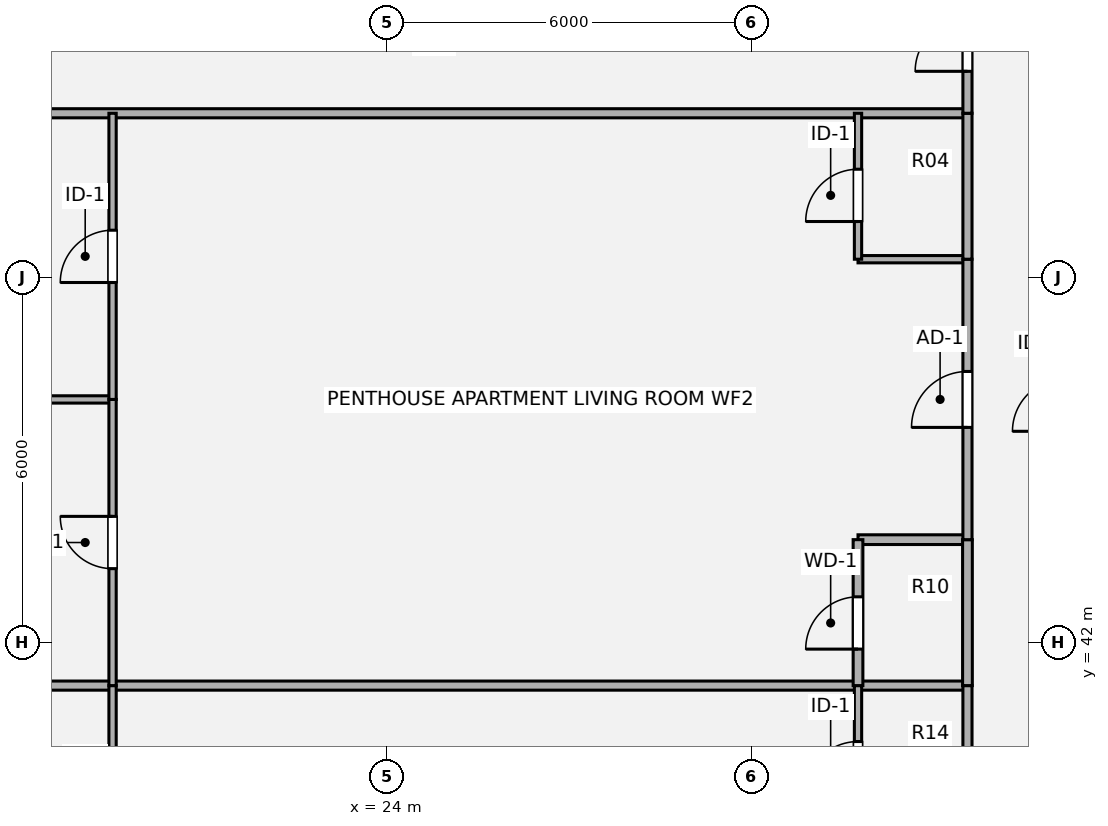
"""IFC4 building model, lengths in metres.
Left out: names, types, materials, properties, quantities, classifications, styles, units other than length and angle.
Written with IfcOpenShell. Run it as: python <this file> out.ifc"""

import sys

from ifc_helpers import new_model, si_unit, direction, frame, frame_2d, origin, origin_2d, place, context, subcontext, project, spatial, rectangle, extrude, source, transform, mapped, element, fill, save


model = new_model("IFC4")
c1 = context("Model", 3, precision=1e-05, world=origin(), true_north=direction((0.0, 1.0)))
c2 = subcontext(c1, "Body", "Model", "MODEL_VIEW")
j1 = project(units=[si_unit("LENGTHUNIT", "METRE"), si_unit("PLANEANGLEUNIT", "RADIAN")], contexts=[c1])
p1 = place(None, origin())
s1 = spatial("IfcSite", under=j1, at=p1, CompositionType="ELEMENT")
p2 = place(p1, origin())
s2 = spatial("IfcBuilding", under=s1, at=p2, CompositionType="ELEMENT")
p3 = place(p2, frame((0.0, 0.0, 160.2)))
s3 = spatial("IfcBuildingStorey", under=s2, at=p3, CompositionType="ELEMENT", Elevation=160.2)
p4 = place(p3, frame((15.88, 41.288, 0.0), z_axis=(0.0, 0.0, 1.0), x_axis=(1.0, 0.0, 0.0)))
e1 = element("IfcWall", 1, at=p4, inside=s3, PredefinedType="PARTITIONING", context=c2, shape_type="SweptSolid", body=[
    extrude(rectangle(XDim=17.67, YDim=0.15, at=frame_2d((8.835, 0.0))), origin(), (0.0, 0.0, 1.0), 2.982),
])
p5 = place(p3, frame((31.75, 43.688, 0.0), z_axis=(0.0, 0.0, 1.0), x_axis=(1.0, 0.0, 0.0)))
e2 = element("IfcWall", 2, at=p5, inside=s3, PredefinedType="PLUMBINGWALL", context=c2, shape_type="SweptSolid", body=[
    extrude(rectangle(XDim=1.8, YDim=0.16, at=frame_2d((0.9, 0.0))), origin(), (0.0, 0.0, 1.0), 3.259),
])
p6 = place(p3, frame((15.88, 45.994, 0.0), z_axis=(0.0, 0.0, 1.0), x_axis=(1.0, 0.0, 0.0)))
e3 = element("IfcWall", 3, at=p6, inside=s3, PredefinedType="PARTITIONING", context=c2, shape_type="SweptSolid", body=[
    extrude(rectangle(XDim=3.61, YDim=0.12, at=frame_2d((1.805, 0.0))), origin(), (0.0, 0.0, 1.0), 2.903),
])
p7 = place(p3, frame((31.75, 48.3, 0.0), z_axis=(0.0, 0.0, 1.0), x_axis=(1.0, 0.0, 0.0)))
e4 = element("IfcWall", 4, at=p7, inside=s3, PredefinedType="PARTITIONING", context=c2, shape_type="SweptSolid", body=[
    extrude(rectangle(XDim=1.8, YDim=0.12, at=frame_2d((0.9, 0.0))), origin(), (0.0, 0.0, 1.0), 3.259),
])
p8 = place(p3, frame((15.981, 50.7, 0.0), z_axis=(0.0, 0.0, 1.0), x_axis=(1.0, 0.0, 0.0)))
e5 = element("IfcWall", 5, at=p8, inside=s3, PredefinedType="PARTITIONING", context=c2, shape_type="SweptSolid", body=[
    extrude(rectangle(XDim=17.569, YDim=0.15, at=frame_2d((8.785, 0.0))), origin(), (0.0, 0.0, 1.0), 3.308),
])
p9 = place(p3, frame((19.49, 36.944, 0.0), z_axis=(0.0, 0.0, 1.0), x_axis=(0.0, 1.0, 0.0)))
e6 = element("IfcWall", 6, at=p9, inside=s3, PredefinedType="PARTITIONING", context=c2, shape_type="SweptSolid", body=[
    extrude(rectangle(XDim=4.344, YDim=0.12, at=frame_2d((2.172, 0.0))), origin(), (0.0, 0.0, 1.0), 3.5),
])
p10 = place(p9, frame((1.742, 0.0, 0.0)))
e7 = element("IfcOpeningElement", 7, at=p10, cuts=e6, PredefinedType="OPENING", context=c2, shape_type="SweptSolid", body=[
    extrude(rectangle(XDim=0.86, YDim=2.1, at=origin_2d()), frame((0.43, 0.07, 1.05), z_axis=(0.0, -1.0, 0.0), x_axis=(1.0, 0.0, 0.0)), (0.0, 0.0, 1.0), 0.14),
])
p11 = place(p3, frame((19.49, 41.288, 0.0), z_axis=(0.0, 0.0, 1.0), x_axis=(0.0, 1.0, 0.0)))
e8 = element("IfcWall", 8, at=p11, inside=s3, PredefinedType="PARTITIONING", context=c2, shape_type="SweptSolid", body=[
    extrude(rectangle(XDim=4.706, YDim=0.12, at=frame_2d((2.353, 0.0))), origin(), (0.0, 0.0, 1.0), 3.5),
])
p12 = place(p11, frame((1.923, 0.0, 0.0)))
e9 = element("IfcOpeningElement", 9, at=p12, cuts=e8, PredefinedType="OPENING", context=c2, shape_type="SweptSolid", body=[
    extrude(rectangle(XDim=0.86, YDim=2.1, at=origin_2d()), frame((0.43, 0.07, 1.05), z_axis=(0.0, -1.0, 0.0), x_axis=(1.0, 0.0, 0.0)), (0.0, 0.0, 1.0), 0.14),
])
p13 = place(p3, frame((19.49, 45.994, 0.0), z_axis=(0.0, 0.0, 1.0), x_axis=(0.0, 1.0, 0.0)))
e10 = element("IfcWall", 10, at=p13, inside=s3, PredefinedType="PARTITIONING", context=c2, shape_type="SweptSolid", body=[
    extrude(rectangle(XDim=4.706, YDim=0.12, at=frame_2d((2.353, 0.0))), origin(), (0.0, 0.0, 1.0), 3.5),
])
p14 = place(p13, frame((1.923, 0.0, 0.0)))
e11 = element("IfcOpeningElement", 11, at=p14, cuts=e10, PredefinedType="OPENING", context=c2, shape_type="SweptSolid", body=[
    extrude(rectangle(XDim=0.86, YDim=2.1, at=origin_2d()), frame((0.43, 0.07, 1.05), z_axis=(0.0, -1.0, 0.0), x_axis=(1.0, 0.0, 0.0)), (0.0, 0.0, 1.0), 0.14),
])
p15 = place(p3, frame((31.75, 38.888, 0.0), z_axis=(0.0, 0.0, 1.0), x_axis=(0.0, 1.0, 0.0)))
e12 = element("IfcWall", 12, at=p15, inside=s3, PredefinedType="PARTITIONING", context=c2, shape_type="SweptSolid", body=[
    extrude(rectangle(XDim=2.4, YDim=0.12, at=frame_2d((1.2, 0.0))), origin(), (0.0, 0.0, 1.0), 3.5),
])
p16 = place(p15, frame((0.62, 0.0, 0.0)))
e13 = element("IfcOpeningElement", 13, at=p16, cuts=e12, PredefinedType="OPENING", context=c2, shape_type="SweptSolid", body=[
    extrude(rectangle(XDim=0.86, YDim=2.1, at=origin_2d()), frame((0.43, 0.07, 1.05), z_axis=(0.0, -1.0, 0.0), x_axis=(1.0, 0.0, 0.0)), (0.0, 0.0, 1.0), 0.14),
])
p17 = place(p3, frame((31.75, 41.288, 0.0), z_axis=(0.0, 0.0, 1.0), x_axis=(0.0, 1.0, 0.0)))
e14 = element("IfcWall", 14, at=p17, inside=s3, PredefinedType="PLUMBINGWALL", context=c2, shape_type="SweptSolid", body=[
    extrude(rectangle(XDim=2.4, YDim=0.16, at=frame_2d((1.2, 0.0))), origin(), (0.0, 0.0, 1.0), 3.5),
])
p18 = place(p17, frame((0.6, 0.0, 0.0)))
e15 = element("IfcOpeningElement", 15, at=p18, cuts=e14, PredefinedType="OPENING", context=c2, shape_type="SweptSolid", body=[
    extrude(rectangle(XDim=0.86, YDim=2.1, at=origin_2d()), frame((0.43, 0.09, 1.05), z_axis=(0.0, -1.0, 0.0), x_axis=(1.0, 0.0, 0.0)), (0.0, 0.0, 1.0), 0.18),
])
p19 = place(p3, frame((31.75, 48.3, 0.0), z_axis=(0.0, 0.0, 1.0), x_axis=(0.0, 1.0, 0.0)))
e16 = element("IfcWall", 16, at=p19, inside=s3, PredefinedType="PARTITIONING", context=c2, shape_type="SweptSolid", body=[
    extrude(rectangle(XDim=2.4, YDim=0.12, at=frame_2d((1.2, 0.0))), origin(), (0.0, 0.0, 1.0), 3.5),
])
p20 = place(p19, frame((0.62, 0.0, 0.0)))
e17 = element("IfcOpeningElement", 17, at=p20, cuts=e16, PredefinedType="OPENING", context=c2, shape_type="SweptSolid", body=[
    extrude(rectangle(XDim=0.86, YDim=2.1, at=origin_2d()), frame((0.43, 0.07, 1.05), z_axis=(0.0, -1.0, 0.0), x_axis=(1.0, 0.0, 0.0)), (0.0, 0.0, 1.0), 0.14),
])
p21 = place(p3, frame((33.55, 38.888, 0.0), z_axis=(0.0, 0.0, 1.0), x_axis=(0.0, 1.0, 0.0)))
e18 = element("IfcWall", 18, at=p21, inside=s3, PredefinedType="PARTITIONING", context=c2, shape_type="SweptSolid", body=[
    extrude(rectangle(XDim=2.4, YDim=0.15, at=frame_2d((1.2, 0.0))), origin(), (0.0, 0.0, 1.0), 3.5),
])
p22 = place(p3, frame((33.55, 41.288, 0.0), z_axis=(0.0, 0.0, 1.0), x_axis=(0.0, 1.0, 0.0)))
e19 = element("IfcWall", 19, at=p22, inside=s3, PredefinedType="PLUMBINGWALL", context=c2, shape_type="SweptSolid", body=[
    extrude(rectangle(XDim=2.4, YDim=0.16, at=frame_2d((1.2, 0.0))), origin(), (0.0, 0.0, 1.0), 3.5),
])
p23 = place(p3, frame((33.55, 43.688, 0.0), z_axis=(0.0, 0.0, 1.0), x_axis=(0.0, 1.0, 0.0)))
e20 = element("IfcWall", 20, at=p23, inside=s3, PredefinedType="PARTITIONING", context=c2, shape_type="SweptSolid", body=[
    extrude(rectangle(XDim=4.612, YDim=0.15, at=frame_2d((2.306, 0.0))), origin(), (0.0, 0.0, 1.0), 3.5),
])
p24 = place(p23, frame((1.846, 0.0, 0.0)))
e21 = element("IfcOpeningElement", 21, at=p24, cuts=e20, PredefinedType="OPENING", context=c2, shape_type="SweptSolid", body=[
    extrude(rectangle(XDim=0.92, YDim=2.1, at=origin_2d()), frame((0.46, 0.085, 1.05), z_axis=(0.0, -1.0, 0.0), x_axis=(1.0, 0.0, 0.0)), (0.0, 0.0, 1.0), 0.17),
])
p25 = place(p3, frame((33.55, 48.3, 0.0), z_axis=(0.0, 0.0, 1.0), x_axis=(0.0, 1.0, 0.0)))
e22 = element("IfcWall", 22, at=p25, inside=s3, PredefinedType="PARTITIONING", context=c2, shape_type="SweptSolid", body=[
    extrude(rectangle(XDim=2.4, YDim=0.15, at=frame_2d((1.2, 0.0))), origin(), (0.0, 0.0, 1.0), 3.5),
])
p26 = place(p3, frame((33.55, 50.7, 0.0), z_axis=(0.0, 0.0, 1.0), x_axis=(0.0, 1.0, 0.0)))
e23 = element("IfcWall", 23, at=p26, inside=s3, PredefinedType="PARTITIONING", context=c2, shape_type="SweptSolid", body=[
    extrude(rectangle(XDim=2.3, YDim=0.15, at=frame_2d((1.15, 0.0))), origin(), (0.0, 0.0, 1.0), 3.5),
])
p27 = place(p26, frame((0.69, 0.0, 0.0)))
e24 = element("IfcOpeningElement", 24, at=p27, cuts=e23, PredefinedType="OPENING", context=c2, shape_type="SweptSolid", body=[
    extrude(rectangle(XDim=0.86, YDim=2.1, at=origin_2d()), frame((0.43, 0.085, 1.05), z_axis=(0.0, -1.0, 0.0), x_axis=(1.0, 0.0, 0.0)), (0.0, 0.0, 1.0), 0.17),
])
m1 = source(origin(), c2, "Body", "SweptSolid", [
    extrude(rectangle(XDim=0.86, YDim=2.1, at=origin_2d()), frame((0.43, 0.025, 1.05), z_axis=(0.0, -1.0, 0.0), x_axis=(1.0, 0.0, 0.0)), (0.0, 0.0, 1.0), 0.05),
])
p28 = place(p12, origin())
e25 = element("IfcDoor", 25, at=p28, inside=s3, OperationType="SINGLE_SWING_RIGHT", PredefinedType="DOOR", context=c2, shape_type="MappedRepresentation", body=[
    mapped(m1, transform((0.0, 0.0, 0.0), x_axis=(1.0, 0.0, 0.0), y_axis=(0.0, 1.0, 0.0), z_axis=(0.0, 0.0, 1.0), scale=1.0)),
])
fill(e9, e25)
p29 = place(p14, origin())
e26 = element("IfcDoor", 26, at=p29, inside=s3, OperationType="SINGLE_SWING_LEFT", PredefinedType="DOOR", context=c2, shape_type="MappedRepresentation", body=[
    mapped(m1, transform((0.0, 0.0, 0.0), x_axis=(1.0, 0.0, 0.0), y_axis=(0.0, 1.0, 0.0), z_axis=(0.0, 0.0, 1.0), scale=1.0)),
])
fill(e11, e26)
p30 = place(p16, origin())
e27 = element("IfcDoor", 27, at=p30, inside=s3, OperationType="SINGLE_SWING_LEFT", PredefinedType="DOOR", context=c2, shape_type="MappedRepresentation", body=[
    mapped(m1, transform((0.0, 0.0, 0.0), x_axis=(1.0, 0.0, 0.0), y_axis=(0.0, 1.0, 0.0), z_axis=(0.0, 0.0, 1.0), scale=1.0)),
])
fill(e13, e27)
m2 = source(origin(), c2, "Body", "SweptSolid", [
    extrude(rectangle(XDim=0.86, YDim=2.1, at=origin_2d()), frame((0.43, 0.025, 1.05), z_axis=(0.0, -1.0, 0.0), x_axis=(1.0, 0.0, 0.0)), (0.0, 0.0, 1.0), 0.05),
])
p31 = place(p18, origin())
e28 = element("IfcDoor", 28, at=p31, inside=s3, OperationType="SINGLE_SWING_LEFT", PredefinedType="DOOR", context=c2, shape_type="MappedRepresentation", body=[
    mapped(m2, transform((0.0, 0.0, 0.0), x_axis=(1.0, 0.0, 0.0), y_axis=(0.0, 1.0, 0.0), z_axis=(0.0, 0.0, 1.0), scale=1.0)),
])
fill(e15, e28)
p32 = place(p20, origin())
e29 = element("IfcDoor", 29, at=p32, inside=s3, OperationType="SINGLE_SWING_LEFT", PredefinedType="DOOR", context=c2, shape_type="MappedRepresentation", body=[
    mapped(m1, transform((0.0, 0.0, 0.0), x_axis=(1.0, 0.0, 0.0), y_axis=(0.0, 1.0, 0.0), z_axis=(0.0, 0.0, 1.0), scale=1.0)),
])
fill(e17, e29)
m3 = source(origin(), c2, "Body", "SweptSolid", [
    extrude(rectangle(XDim=0.92, YDim=2.1, at=origin_2d()), frame((0.46, 0.025, 1.05), z_axis=(0.0, -1.0, 0.0), x_axis=(1.0, 0.0, 0.0)), (0.0, 0.0, 1.0), 0.05),
])
p33 = place(p24, origin())
e30 = element("IfcDoor", 30, at=p33, inside=s3, OperationType="SINGLE_SWING_LEFT", PredefinedType="DOOR", context=c2, shape_type="MappedRepresentation", body=[
    mapped(m3, transform((0.0, 0.0, 0.0), x_axis=(1.0, 0.0, 0.0), y_axis=(0.0, 1.0, 0.0), z_axis=(0.0, 0.0, 1.0), scale=1.0)),
])
fill(e21, e30)
p34 = place(p27, origin())
e31 = element("IfcDoor", 31, at=p34, inside=s3, OperationType="SINGLE_SWING_LEFT", PredefinedType="DOOR", context=c2, shape_type="MappedRepresentation", body=[
    mapped(m1, transform((0.0, 0.0, 0.0), x_axis=(1.0, 0.0, 0.0), y_axis=(0.0, 1.0, 0.0), z_axis=(0.0, 0.0, 1.0), scale=1.0)),
])
fill(e24, e31)
save(model, sys.argv[1])
